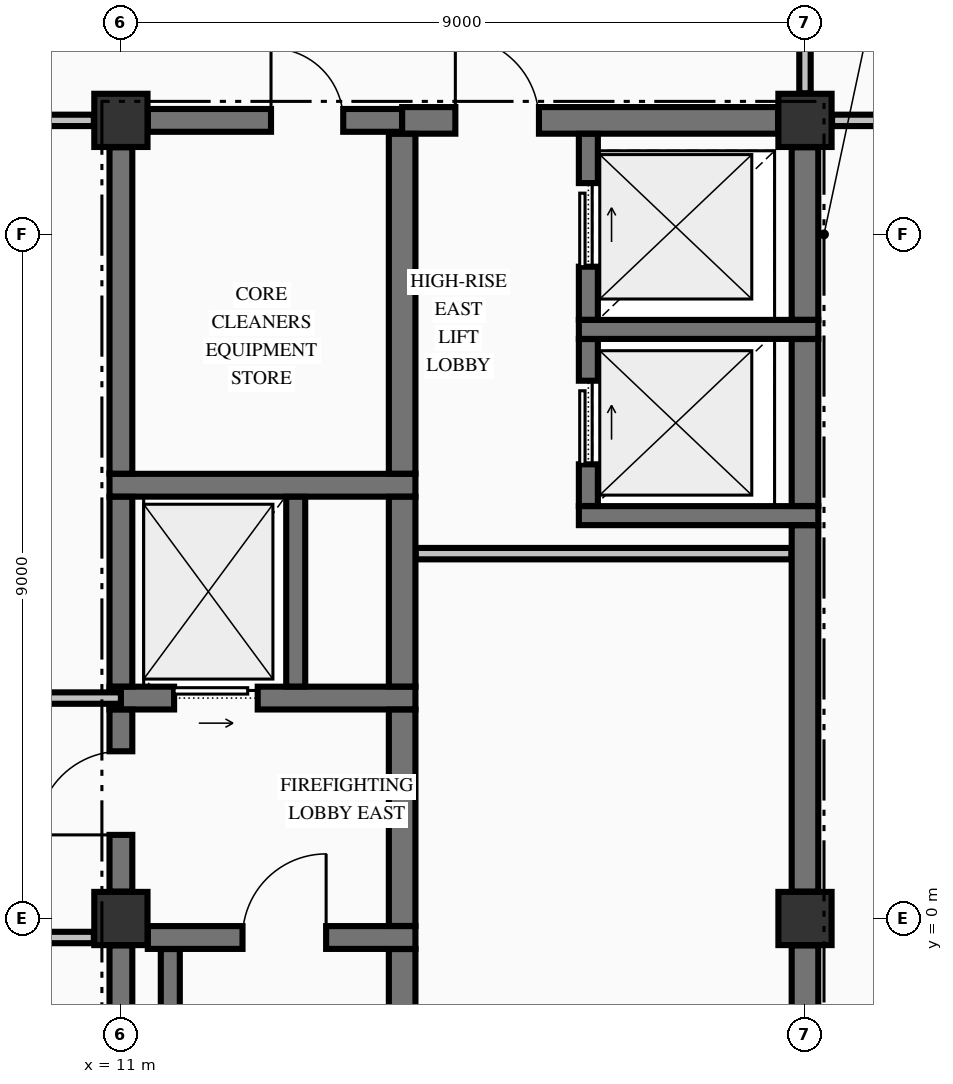
"""IFC4 building model, lengths in metres.
Left out: names, types, materials, properties, quantities, classifications, styles, units other than length and angle.
Written with IfcOpenShell. Run it as: python <this file> out.ifc"""

import sys

from ifc_helpers import new_model, si_unit, direction, frame, frame_2d, origin, origin_2d, place, context, subcontext, project, spatial, rectangle, extrude, element, fill, save


model = new_model("IFC4")
c1 = context("Model", 3, precision=1e-05, world=origin(), true_north=direction((0.0, 1.0)))
c2 = subcontext(c1, "Body", "Model", "MODEL_VIEW")
j1 = project(units=[si_unit("LENGTHUNIT", "METRE"), si_unit("PLANEANGLEUNIT", "RADIAN")], contexts=[c1])
p1 = place(None, origin())
s1 = spatial("IfcSite", under=j1, at=p1, CompositionType="ELEMENT")
p2 = place(p1, origin())
s2 = spatial("IfcBuilding", under=s1, at=p2, CompositionType="ELEMENT")
p3 = place(p2, frame((0.0, 0.0, 236.51)))
s3 = spatial("IfcBuildingStorey", under=s2, at=p3, CompositionType="ELEMENT", Elevation=236.51)
for number, where, z_axis, x_axis in (
    (1, (11.0, 0.0, -0.25), (0.0, 0.0, 1.0), (1.0, 0.0, 0.0)),
    (2, (11.0, 10.5, -0.25), (0.0, 0.0, 1.0), (1.0, 0.0, 0.0)),
    (3, (20.0, 10.5, -0.25), (0.0, 0.0, 1.0), (1.0, 0.0, 0.0)),
    (4, (20.0, 0.0, -0.25), (0.0, 0.0, 1.0), (1.0, 0.0, 0.0)),
):
    element("IfcColumn", number, at=place(p3, frame(where, z_axis=z_axis, x_axis=x_axis)), inside=s3, PredefinedType="COLUMN", context=c2, shape_type="SweptSolid", body=[
        extrude(rectangle(XDim=0.7, YDim=0.7, at=origin_2d()), origin(), (0.0, 0.0, 1.0), 3.23),
    ])
p4 = place(p3, frame((11.354, -0.25, 0.0), z_axis=(0.0, 0.0, 1.0), x_axis=(1.0, 0.0, 0.0)))
e5 = element("IfcWall", 5, at=p4, inside=s3, PredefinedType="SHEAR", context=c2, shape_type="SweptSolid", body=[
    extrude(rectangle(XDim=3.521, YDim=0.3, at=frame_2d((1.76, 0.0))), origin(), (0.0, 0.0, 1.0), 2.98),
])
p5 = place(p4, frame((1.246, 0.0, 0.0)))
e6 = element("IfcOpeningElement", 6, at=p5, cuts=e5, PredefinedType="OPENING", context=c2, shape_type="SweptSolid", body=[
    extrude(rectangle(XDim=1.1, YDim=2.15, at=frame_2d((0.55, 1.075))), frame((0.0, 0.16, 0.0), z_axis=(0.0, -1.0, 0.0), x_axis=(1.0, 0.0, 0.0)), (0.0, 0.0, 1.0), 0.32),
])
p6 = place(p3, frame((10.85, 2.9, 0.0), z_axis=(0.0, 0.0, 1.0), x_axis=(1.0, 0.0, 0.0)))
e7 = element("IfcWall", 7, at=p6, inside=s3, PredefinedType="SHEAR", context=c2, shape_type="SweptSolid", body=[
    extrude(rectangle(XDim=4.025, YDim=0.3, at=frame_2d((2.012, 0.0))), origin(), (0.0, 0.0, 1.0), 2.98),
])
p7 = place(p6, frame((0.85, 0.0, 0.0)))
e8 = element("IfcOpeningElement", 8, at=p7, cuts=e7, PredefinedType="OPENING", context=c2, shape_type="SweptSolid", body=[
    extrude(rectangle(XDim=1.1, YDim=2.2, at=frame_2d((0.55, 1.1))), frame((0.0, 0.16, 0.0), z_axis=(0.0, -1.0, 0.0), x_axis=(1.0, 0.0, 0.0)), (0.0, 0.0, 1.0), 0.32),
])
p8 = place(p3, frame((17.025, 5.3, 0.0), z_axis=(0.0, 0.0, 1.0), x_axis=(1.0, 0.0, 0.0)))
e9 = element("IfcWall", 9, at=p8, inside=s3, PredefinedType="SOLIDWALL", context=c2, shape_type="SweptSolid", body=[
    extrude(rectangle(XDim=3.15, YDim=0.25, at=frame_2d((1.575, 0.0))), origin(), (0.0, 0.0, 1.0), 2.98),
])
p9 = place(p3, frame((10.85, 5.7, 0.0), z_axis=(0.0, 0.0, 1.0), x_axis=(1.0, 0.0, 0.0)))
e10 = element("IfcWall", 10, at=p9, inside=s3, PredefinedType="SHEAR", context=c2, shape_type="SweptSolid", body=[
    extrude(rectangle(XDim=4.025, YDim=0.3, at=frame_2d((2.012, 0.0))), origin(), (0.0, 0.0, 1.0), 2.98),
])
p10 = place(p3, frame((17.025, 7.75, 0.0), z_axis=(0.0, 0.0, 1.0), x_axis=(1.0, 0.0, 0.0)))
e11 = element("IfcWall", 11, at=p10, inside=s3, PredefinedType="SOLIDWALL", context=c2, shape_type="SweptSolid", body=[
    extrude(rectangle(XDim=3.15, YDim=0.25, at=frame_2d((1.575, 0.0))), origin(), (0.0, 0.0, 1.0), 2.98),
])
p11 = place(p3, frame((11.354, 10.5, 0.0), z_axis=(0.0, 0.0, 1.0), x_axis=(1.0, 0.0, 0.0)))
e12 = element("IfcWall", 12, at=p11, inside=s3, PredefinedType="SHEAR", context=c2, shape_type="SweptSolid", body=[
    extrude(rectangle(XDim=3.346, YDim=0.3, at=frame_2d((1.673, 0.0))), origin(), (0.0, 0.0, 1.0), 2.98),
])
p12 = place(p11, frame((1.621, 0.0, 0.0)))
e13 = element("IfcOpeningElement", 13, at=p12, cuts=e12, PredefinedType="OPENING", context=c2, shape_type="SweptSolid", body=[
    extrude(rectangle(XDim=0.95, YDim=2.15, at=frame_2d((0.475, 1.075))), frame((0.0, 0.16, 0.0), z_axis=(0.0, -1.0, 0.0), x_axis=(1.0, 0.0, 0.0)), (0.0, 0.0, 1.0), 0.32),
])
p13 = place(p3, frame((14.7, 10.5, 0.0), z_axis=(0.0, 0.0, 1.0), x_axis=(1.0, 0.0, 0.0)))
e14 = element("IfcWall", 14, at=p13, inside=s3, PredefinedType="SHEAR", context=c2, shape_type="SweptSolid", body=[
    extrude(rectangle(XDim=4.946, YDim=0.35, at=frame_2d((2.473, 0.0))), origin(), (0.0, 0.0, 1.0), 2.98),
])
p14 = place(p13, frame((0.7, 0.0, 0.0)))
e15 = element("IfcOpeningElement", 15, at=p14, cuts=e14, PredefinedType="OPENING", context=c2, shape_type="SweptSolid", body=[
    extrude(rectangle(XDim=1.1, YDim=2.15, at=frame_2d((0.55, 1.075))), frame((0.0, 0.185, 0.0), z_axis=(0.0, -1.0, 0.0), x_axis=(1.0, 0.0, 0.0)), (0.0, 0.0, 1.0), 0.37),
])
p15 = place(p3, frame((-10.644, -0.25, 0.0), z_axis=(0.0, 0.0, 1.0), x_axis=(1.0, 0.0, 0.0)))
e16 = element("IfcWall", 16, at=p15, inside=s3, PredefinedType="PARTITIONING", context=c2, shape_type="SweptSolid", body=[
    extrude(rectangle(XDim=21.288, YDim=0.15, at=frame_2d((10.644, 0.0))), origin(), (0.0, 0.0, 1.0), 2.98),
])
p16 = place(p15, frame((6.394, 0.0, 0.0)))
e17 = element("IfcOpeningElement", 17, at=p16, cuts=e16, PredefinedType="OPENING", context=c2, shape_type="SweptSolid", body=[
    extrude(rectangle(XDim=1.1, YDim=2.15, at=frame_2d((0.55, 1.075))), frame((0.0, 0.085, 0.0), z_axis=(0.0, -1.0, 0.0), x_axis=(1.0, 0.0, 0.0)), (0.0, 0.0, 1.0), 0.17),
])
p17 = place(p15, frame((2.219, 0.0, 0.0)))
e18 = element("IfcOpeningElement", 18, at=p17, cuts=e16, PredefinedType="OPENING", context=c2, shape_type="SweptSolid", body=[
    extrude(rectangle(XDim=1.05, YDim=2.15, at=frame_2d((0.525, 1.075))), frame((0.0, 0.085, 0.0), z_axis=(0.0, -1.0, 0.0), x_axis=(1.0, 0.0, 0.0)), (0.0, 0.0, 1.0), 0.17),
])
p18 = place(p15, frame((14.369, 0.0, 0.0)))
e19 = element("IfcOpeningElement", 19, at=p18, cuts=e16, PredefinedType="OPENING", context=c2, shape_type="SweptSolid", body=[
    extrude(rectangle(XDim=0.95, YDim=2.15, at=frame_2d((0.475, 1.075))), frame((0.0, 0.085, 0.0), z_axis=(0.0, -1.0, 0.0), x_axis=(1.0, 0.0, 0.0)), (0.0, 0.0, 1.0), 0.17),
])
p19 = place(p3, frame((-11.0, 2.9, 0.0), z_axis=(0.0, 0.0, 1.0), x_axis=(1.0, 0.0, 0.0)))
e20 = element("IfcWall", 20, at=p19, inside=s3, PredefinedType="PARTITIONING", context=c2, shape_type="SweptSolid", body=[
    extrude(rectangle(XDim=22.0, YDim=0.15, at=frame_2d((11.0, 0.0))), origin(), (0.0, 0.0, 1.0), 2.98),
])
p20 = place(p19, frame((6.75, 0.0, 0.0)))
e21 = element("IfcOpeningElement", 21, at=p20, cuts=e20, PredefinedType="OPENING", context=c2, shape_type="SweptSolid", body=[
    extrude(rectangle(XDim=1.1, YDim=2.15, at=frame_2d((0.55, 1.075))), frame((0.0, 0.085, 0.0), z_axis=(0.0, -1.0, 0.0), x_axis=(1.0, 0.0, 0.0)), (0.0, 0.0, 1.0), 0.17),
])
p21 = place(p19, frame((2.575, 0.0, 0.0)))
e22 = element("IfcOpeningElement", 22, at=p21, cuts=e20, PredefinedType="OPENING", context=c2, shape_type="SweptSolid", body=[
    extrude(rectangle(XDim=1.05, YDim=2.15, at=frame_2d((0.525, 1.075))), frame((0.0, 0.085, 0.0), z_axis=(0.0, -1.0, 0.0), x_axis=(1.0, 0.0, 0.0)), (0.0, 0.0, 1.0), 0.17),
])
p22 = place(p19, frame((14.65, 0.0, 0.0)))
e23 = element("IfcOpeningElement", 23, at=p22, cuts=e20, PredefinedType="OPENING", context=c2, shape_type="SweptSolid", body=[
    extrude(rectangle(XDim=1.1, YDim=2.15, at=frame_2d((0.55, 1.075))), frame((0.0, 0.085, 0.0), z_axis=(0.0, -1.0, 0.0), x_axis=(1.0, 0.0, 0.0)), (0.0, 0.0, 1.0), 0.17),
])
p23 = place(p3, frame((14.878, 4.8, 0.0), z_axis=(0.0, 0.0, 1.0), x_axis=(1.0, 0.0, 0.0)))
e24 = element("IfcWall", 24, at=p23, inside=s3, PredefinedType="PARTITIONING", context=c2, shape_type="SweptSolid", body=[
    extrude(rectangle(XDim=4.944, YDim=0.15, at=frame_2d((2.472, 0.0))), origin(), (0.0, 0.0, 1.0), 2.98),
])
p24 = place(p3, frame((-10.644, 10.5, 0.0), z_axis=(0.0, 0.0, 1.0), x_axis=(1.0, 0.0, 0.0)))
e25 = element("IfcWall", 25, at=p24, inside=s3, PredefinedType="PARTITIONING", context=c2, shape_type="SweptSolid", body=[
    extrude(rectangle(XDim=21.288, YDim=0.15, at=frame_2d((10.644, 0.0))), origin(), (0.0, 0.0, 1.0), 2.98),
])
p25 = place(p24, frame((6.394, 0.0, 0.0)))
e26 = element("IfcOpeningElement", 26, at=p25, cuts=e25, PredefinedType="OPENING", context=c2, shape_type="SweptSolid", body=[
    extrude(rectangle(XDim=1.1, YDim=2.15, at=frame_2d((0.55, 1.075))), frame((0.0, 0.085, 0.0), z_axis=(0.0, -1.0, 0.0), x_axis=(1.0, 0.0, 0.0)), (0.0, 0.0, 1.0), 0.17),
])
p26 = place(p3, frame((20.356, 10.5, 0.0), z_axis=(0.0, 0.0, 1.0), x_axis=(1.0, 0.0, 0.0)))
e27 = element("IfcWall", 27, at=p26, inside=s3, PredefinedType="PARTITIONING", context=c2, shape_type="SweptSolid", body=[
    extrude(rectangle(XDim=5.479, YDim=0.15, at=frame_2d((2.74, 0.0))), origin(), (0.0, 0.0, 1.0), 2.98),
])
p27 = place(p26, frame((2.144, 0.0, 0.0)))
e28 = element("IfcOpeningElement", 28, at=p27, cuts=e27, PredefinedType="OPENING", context=c2, shape_type="SweptSolid", body=[
    extrude(rectangle(XDim=1.0, YDim=2.15, at=frame_2d((0.5, 1.075))), frame((0.0, 0.085, 0.0), z_axis=(0.0, -1.0, 0.0), x_axis=(1.0, 0.0, 0.0)), (0.0, 0.0, 1.0), 0.17),
])
p28 = place(p3, frame((11.0, -9.596, 0.0), z_axis=(0.0, 0.0, 1.0), x_axis=(0.0, 1.0, 0.0)))
e29 = element("IfcWall", 29, at=p28, inside=s3, PredefinedType="SHEAR", context=c2, shape_type="SweptSolid", body=[
    extrude(rectangle(XDim=9.242, YDim=0.3, at=frame_2d((4.621, 0.0))), origin(), (0.0, 0.0, 1.0), 2.98),
])
p29 = place(p3, frame((11.0, 0.354, 0.0), z_axis=(0.0, 0.0, 1.0), x_axis=(0.0, 1.0, 0.0)))
e30 = element("IfcWall", 30, at=p29, inside=s3, PredefinedType="SHEAR", context=c2, shape_type="SweptSolid", body=[
    extrude(rectangle(XDim=2.394, YDim=0.3, at=frame_2d((1.197, 0.0))), origin(), (0.0, 0.0, 1.0), 2.98),
])
p30 = place(p29, frame((0.746, 0.0, 0.0)))
e31 = element("IfcOpeningElement", 31, at=p30, cuts=e30, PredefinedType="OPENING", context=c2, shape_type="SweptSolid", body=[
    extrude(rectangle(XDim=1.1, YDim=2.15, at=frame_2d((0.55, 1.075))), frame((0.0, 0.16, 0.0), z_axis=(0.0, -1.0, 0.0), x_axis=(1.0, 0.0, 0.0)), (0.0, 0.0, 1.0), 0.32),
])
p31 = place(p3, frame((11.0, 3.052, 0.0), z_axis=(0.0, 0.0, 1.0), x_axis=(0.0, 1.0, 0.0)))
e32 = element("IfcWall", 32, at=p31, inside=s3, PredefinedType="SHEAR", context=c2, shape_type="SweptSolid", body=[
    extrude(rectangle(XDim=2.496, YDim=0.3, at=frame_2d((1.248, 0.0))), origin(), (0.0, 0.0, 1.0), 2.98),
])
p32 = place(p3, frame((11.0, 5.852, 0.0), z_axis=(0.0, 0.0, 1.0), x_axis=(0.0, 1.0, 0.0)))
e33 = element("IfcWall", 33, at=p32, inside=s3, PredefinedType="SHEAR", context=c2, shape_type="SweptSolid", body=[
    extrude(rectangle(XDim=4.294, YDim=0.3, at=frame_2d((2.147, 0.0))), origin(), (0.0, 0.0, 1.0), 2.98),
])
p33 = place(p3, frame((11.65, -9.798, 0.0), z_axis=(0.0, 0.0, 1.0), x_axis=(0.0, 1.0, 0.0)))
e34 = element("IfcWall", 34, at=p33, inside=s3, PredefinedType="SOLIDWALL", context=c2, shape_type="SweptSolid", body=[
    extrude(rectangle(XDim=9.396, YDim=0.25, at=frame_2d((4.698, 0.0))), origin(), (0.0, 0.0, 1.0), 2.98),
])
p34 = place(p3, frame((13.3, 3.052, 0.0), z_axis=(0.0, 0.0, 1.0), x_axis=(0.0, 1.0, 0.0)))
e35 = element("IfcWall", 35, at=p34, inside=s3, PredefinedType="SOLIDWALL", context=c2, shape_type="SweptSolid", body=[
    extrude(rectangle(XDim=2.496, YDim=0.25, at=frame_2d((1.248, 0.0))), origin(), (0.0, 0.0, 1.0), 2.98),
])
p35 = place(p3, frame((14.7, -9.773, 0.0), z_axis=(0.0, 0.0, 1.0), x_axis=(0.0, 1.0, 0.0)))
e36 = element("IfcWall", 36, at=p35, inside=s3, PredefinedType="SHEAR", context=c2, shape_type="SweptSolid", body=[
    extrude(rectangle(XDim=9.371, YDim=0.35, at=frame_2d((4.686, 0.0))), origin(), (0.0, 0.0, 1.0), 2.98),
])
p36 = place(p3, frame((14.7, -0.098, 0.0), z_axis=(0.0, 0.0, 1.0), x_axis=(0.0, 1.0, 0.0)))
e37 = element("IfcWall", 37, at=p36, inside=s3, PredefinedType="SHEAR", context=c2, shape_type="SweptSolid", body=[
    extrude(rectangle(XDim=2.846, YDim=0.35, at=frame_2d((1.423, 0.0))), origin(), (0.0, 0.0, 1.0), 2.98),
])
p37 = place(p3, frame((14.7, 3.052, 0.0), z_axis=(0.0, 0.0, 1.0), x_axis=(0.0, 1.0, 0.0)))
e38 = element("IfcWall", 38, at=p37, inside=s3, PredefinedType="SHEAR", context=c2, shape_type="SweptSolid", body=[
    extrude(rectangle(XDim=2.496, YDim=0.35, at=frame_2d((1.248, 0.0))), origin(), (0.0, 0.0, 1.0), 2.98),
])
p38 = place(p3, frame((14.7, 5.852, 0.0), z_axis=(0.0, 0.0, 1.0), x_axis=(0.0, 1.0, 0.0)))
e39 = element("IfcWall", 39, at=p38, inside=s3, PredefinedType="SHEAR", context=c2, shape_type="SweptSolid", body=[
    extrude(rectangle(XDim=4.471, YDim=0.35, at=frame_2d((2.235, 0.0))), origin(), (0.0, 0.0, 1.0), 2.98),
])
p39 = place(p3, frame((17.15, 5.427, 0.0), z_axis=(0.0, 0.0, 1.0), x_axis=(0.0, 1.0, 0.0)))
e40 = element("IfcWall", 40, at=p39, inside=s3, PredefinedType="SOLIDWALL", context=c2, shape_type="SweptSolid", body=[
    extrude(rectangle(XDim=2.196, YDim=0.25, at=frame_2d((1.098, 0.0))), origin(), (0.0, 0.0, 1.0), 2.98),
])
p40 = place(p39, frame((0.548, 0.0, 0.0)))
e41 = element("IfcOpeningElement", 41, at=p40, cuts=e40, PredefinedType="OPENING", context=c2, shape_type="SweptSolid", body=[
    extrude(rectangle(XDim=1.1, YDim=2.2, at=frame_2d((0.55, 1.1))), frame((0.0, 0.135, 0.0), z_axis=(0.0, -1.0, 0.0), x_axis=(1.0, 0.0, 0.0)), (0.0, 0.0, 1.0), 0.27),
])
p41 = place(p3, frame((17.15, 7.877, 0.0), z_axis=(0.0, 0.0, 1.0), x_axis=(0.0, 1.0, 0.0)))
e42 = element("IfcWall", 42, at=p41, inside=s3, PredefinedType="SOLIDWALL", context=c2, shape_type="SweptSolid", body=[
    extrude(rectangle(XDim=2.446, YDim=0.25, at=frame_2d((1.223, 0.0))), origin(), (0.0, 0.0, 1.0), 2.98),
])
p42 = place(p41, frame((0.698, 0.0, 0.0)))
e43 = element("IfcOpeningElement", 43, at=p42, cuts=e42, PredefinedType="OPENING", context=c2, shape_type="SweptSolid", body=[
    extrude(rectangle(XDim=1.1, YDim=2.2, at=frame_2d((0.55, 1.1))), frame((0.0, 0.135, 0.0), z_axis=(0.0, -1.0, 0.0), x_axis=(1.0, 0.0, 0.0)), (0.0, 0.0, 1.0), 0.27),
])
p43 = place(p3, frame((20.0, -9.596, 0.0), z_axis=(0.0, 0.0, 1.0), x_axis=(0.0, 1.0, 0.0)))
e44 = element("IfcWall", 44, at=p43, inside=s3, PredefinedType="SHEAR", context=c2, shape_type="SweptSolid", body=[
    extrude(rectangle(XDim=9.242, YDim=0.35, at=frame_2d((4.621, 0.0))), origin(), (0.0, 0.0, 1.0), 2.98),
])
p44 = place(p3, frame((20.0, 0.354, 0.0), z_axis=(0.0, 0.0, 1.0), x_axis=(0.0, 1.0, 0.0)))
e45 = element("IfcWall", 45, at=p44, inside=s3, PredefinedType="SHEAR", context=c2, shape_type="SweptSolid", body=[
    extrude(rectangle(XDim=4.819, YDim=0.35, at=frame_2d((2.41, 0.0))), origin(), (0.0, 0.0, 1.0), 2.98),
])
p45 = place(p3, frame((20.0, 5.427, 0.0), z_axis=(0.0, 0.0, 1.0), x_axis=(0.0, 1.0, 0.0)))
e46 = element("IfcWall", 46, at=p45, inside=s3, PredefinedType="SHEAR", context=c2, shape_type="SweptSolid", body=[
    extrude(rectangle(XDim=2.196, YDim=0.35, at=frame_2d((1.098, 0.0))), origin(), (0.0, 0.0, 1.0), 2.98),
])
p46 = place(p3, frame((20.0, 7.877, 0.0), z_axis=(0.0, 0.0, 1.0), x_axis=(0.0, 1.0, 0.0)))
e47 = element("IfcWall", 47, at=p46, inside=s3, PredefinedType="SHEAR", context=c2, shape_type="SweptSolid", body=[
    extrude(rectangle(XDim=2.269, YDim=0.35, at=frame_2d((1.135, 0.0))), origin(), (0.0, 0.0, 1.0), 2.98),
])
p47 = place(p3, frame((20.0, 10.856, 0.0), z_axis=(0.0, 0.0, 1.0), x_axis=(0.0, 1.0, 0.0)))
e48 = element("IfcWall", 48, at=p47, inside=s3, PredefinedType="PARTITIONING", context=c2, shape_type="SweptSolid", body=[
    extrude(rectangle(XDim=2.416, YDim=0.15, at=frame_2d((1.208, 0.0))), origin(), (0.0, 0.0, 1.0), 2.98),
])
p48 = place(p47, frame((0.599, 0.0, 0.0)))
e49 = element("IfcOpeningElement", 49, at=p48, cuts=e48, PredefinedType="OPENING", context=c2, shape_type="SweptSolid", body=[
    extrude(rectangle(XDim=0.95, YDim=2.15, at=frame_2d((0.475, 1.075))), frame((0.0, 0.085, 0.0), z_axis=(0.0, -1.0, 0.0), x_axis=(1.0, 0.0, 0.0)), (0.0, 0.0, 1.0), 0.17),
])
p49 = place(p5, origin())
e50 = element("IfcDoor", 50, at=p49, inside=s3, OperationType="SINGLE_SWING_RIGHT", PredefinedType="DOOR", context=c2, shape_type="SweptSolid", body=[
    extrude(rectangle(XDim=1.1, YDim=2.15, at=frame_2d((0.55, 1.075))), frame((0.0, 0.025, 0.0), z_axis=(0.0, -1.0, 0.0), x_axis=(1.0, 0.0, 0.0)), (0.0, 0.0, 1.0), 0.05),
])
fill(e6, e50)
p50 = place(p30, origin())
e51 = element("IfcDoor", 51, at=p50, inside=s3, OperationType="SINGLE_SWING_LEFT", PredefinedType="DOOR", context=c2, shape_type="SweptSolid", body=[
    extrude(rectangle(XDim=1.1, YDim=2.15, at=frame_2d((0.55, 1.075))), frame((0.0, 0.025, 0.0), z_axis=(0.0, -1.0, 0.0), x_axis=(1.0, 0.0, 0.0)), (0.0, 0.0, 1.0), 0.05),
])
fill(e31, e51)
p51 = place(p7, origin())
e52 = element("IfcDoor", 52, at=p51, inside=s3, OperationType="SLIDING_TO_RIGHT", PredefinedType="DOOR", context=c2, shape_type="SweptSolid", body=[
    extrude(rectangle(XDim=1.1, YDim=2.2, at=frame_2d((0.55, 1.1))), frame((0.0, 0.025, 0.0), z_axis=(0.0, -1.0, 0.0), x_axis=(1.0, 0.0, 0.0)), (0.0, 0.0, 1.0), 0.05),
])
fill(e8, e52)
p52 = place(p12, origin())
e53 = element("IfcDoor", 53, at=p52, inside=s3, OperationType="SINGLE_SWING_LEFT", PredefinedType="DOOR", context=c2, shape_type="SweptSolid", body=[
    extrude(rectangle(XDim=0.95, YDim=2.15, at=frame_2d((0.475, 1.075))), frame((0.0, 0.025, 0.0), z_axis=(0.0, -1.0, 0.0), x_axis=(1.0, 0.0, 0.0)), (0.0, 0.0, 1.0), 0.05),
])
fill(e13, e53)
p53 = place(p40, origin())
e54 = element("IfcDoor", 54, at=p53, inside=s3, OperationType="SLIDING_TO_RIGHT", PredefinedType="DOOR", context=c2, shape_type="SweptSolid", body=[
    extrude(rectangle(XDim=1.1, YDim=2.2, at=frame_2d((0.55, 1.1))), frame((0.0, 0.025, 0.0), z_axis=(0.0, -1.0, 0.0), x_axis=(1.0, 0.0, 0.0)), (0.0, 0.0, 1.0), 0.05),
])
fill(e41, e54)
p54 = place(p42, origin())
e55 = element("IfcDoor", 55, at=p54, inside=s3, OperationType="SLIDING_TO_RIGHT", PredefinedType="DOOR", context=c2, shape_type="SweptSolid", body=[
    extrude(rectangle(XDim=1.1, YDim=2.2, at=frame_2d((0.55, 1.1))), frame((0.0, 0.025, 0.0), z_axis=(0.0, -1.0, 0.0), x_axis=(1.0, 0.0, 0.0)), (0.0, 0.0, 1.0), 0.05),
])
fill(e43, e55)
p55 = place(p14, origin())
e56 = element("IfcDoor", 56, at=p55, inside=s3, OperationType="SINGLE_SWING_LEFT", PredefinedType="DOOR", context=c2, shape_type="SweptSolid", body=[
    extrude(rectangle(XDim=1.1, YDim=2.15, at=frame_2d((0.55, 1.075))), frame((0.0, 0.025, 0.0), z_axis=(0.0, -1.0, 0.0), x_axis=(1.0, 0.0, 0.0)), (0.0, 0.0, 1.0), 0.05),
])
fill(e15, e56)
save(model, sys.argv[1])
